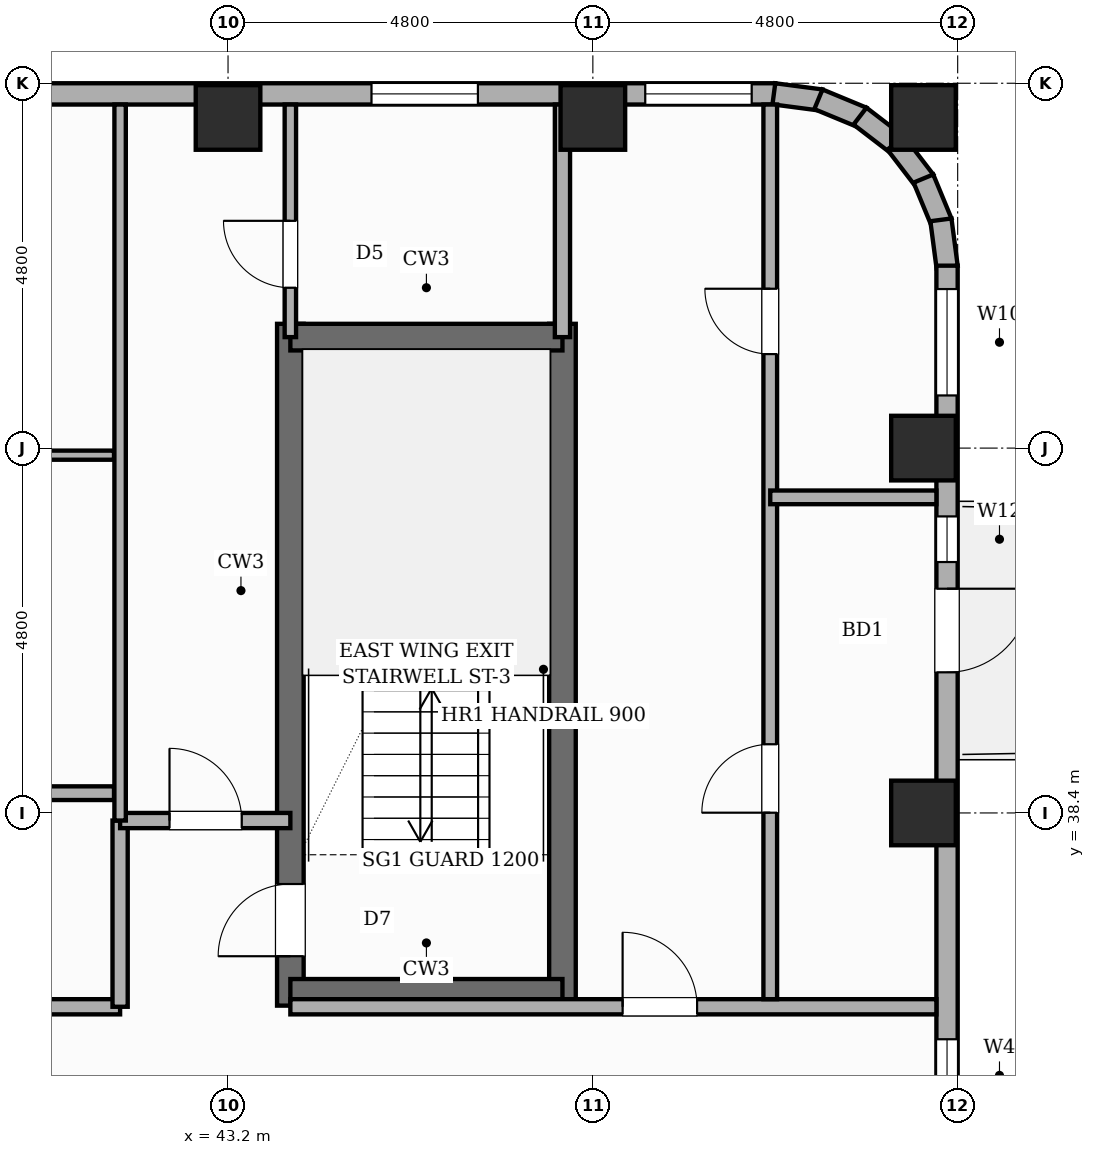
"""IFC4 building model, lengths in metres.
Left out: names, types, materials, properties, quantities, classifications, styles, units other than length and angle.
Written with IfcOpenShell. Run it as: python <this file> out.ifc"""

import sys

from ifc_helpers import new_model, si_unit, direction, frame, frame_2d, origin, origin_2d, place, context, subcontext, project, spatial, rectangle, extrude, element, fill, save


model = new_model("IFC4")
c1 = context("Model", 3, precision=1e-05, world=origin(), true_north=direction((0.0, 1.0)))
c2 = subcontext(c1, "Body", "Model", "MODEL_VIEW")
j1 = project(units=[si_unit("LENGTHUNIT", "METRE"), si_unit("PLANEANGLEUNIT", "RADIAN")], contexts=[c1])
p1 = place(None, origin())
s1 = spatial("IfcSite", under=j1, at=p1, CompositionType="ELEMENT")
p2 = place(p1, origin())
s2 = spatial("IfcBuilding", under=s1, at=p2, CompositionType="ELEMENT")
p3 = place(p2, frame((0.0, 0.0, 211.0)))
s3 = spatial("IfcBuildingStorey", under=s2, at=p3, CompositionType="ELEMENT", Elevation=211.0)
p4 = place(p3, frame((44.02, 35.865, 0.0), z_axis=(0.0, 0.0, 1.0), x_axis=(0.0, 1.0, 0.0)))
e1 = element("IfcWall", 1, at=p4, inside=s3, PredefinedType="SHEAR", context=c2, shape_type="SweptSolid", body=[
    extrude(rectangle(XDim=8.97, YDim=0.35, at=frame_2d((4.485, 0.0))), origin(), (0.0, 0.0, 1.0), 3.6),
])
p5 = place(p4, frame((0.65, 0.0, 0.0)))
e2 = element("IfcOpeningElement", 2, at=p5, cuts=e1, PredefinedType="OPENING", context=c2, shape_type="SweptSolid", body=[
    extrude(rectangle(XDim=0.95, YDim=2.1, at=frame_2d((0.475, 1.05))), frame((0.0, 0.185, 0.0), z_axis=(0.0, -1.0, 0.0), x_axis=(1.0, 0.0, 0.0)), (0.0, 0.0, 1.0), 0.37),
])
p6 = place(p3, frame((47.6, 35.865, 0.0), z_axis=(0.0, 0.0, 1.0), x_axis=(0.0, 1.0, 0.0)))
e3 = element("IfcWall", 3, at=p6, inside=s3, PredefinedType="SHEAR", context=c2, shape_type="SweptSolid", body=[
    extrude(rectangle(XDim=8.97, YDim=0.35, at=frame_2d((4.485, 0.0))), origin(), (0.0, 0.0, 1.0), 3.6),
])
for number, where, z_axis, x_axis in (
    (4, (44.02, 36.04, 0.0), (0.0, 0.0, 1.0), (1.0, 0.0, 0.0)),
    (5, (44.02, 44.66, 0.0), (0.0, 0.0, 1.0), (1.0, 0.0, 0.0)),
):
    element("IfcWall", number, at=place(p3, frame(where, z_axis=z_axis, x_axis=x_axis)), inside=s3, PredefinedType="SHEAR", context=c2, shape_type="SweptSolid", body=[
        extrude(rectangle(XDim=3.58, YDim=0.35, at=frame_2d((1.79, 0.0))), origin(), (0.0, 0.0, 1.0), 3.6),
    ])
for number, where, z_axis, x_axis in (
    (6, (43.2, 47.55, 0.0), (0.0, 0.0, 1.0), (1.0, 0.0, 0.0)),
    (7, (48.0, 47.55, 0.0), (0.0, 0.0, 1.0), (1.0, 0.0, 0.0)),
    (8, (52.35, 38.4, 0.0), (0.0, 0.0, 1.0), (1.0, 0.0, 0.0)),
    (9, (52.35, 43.2, 0.0), (0.0, 0.0, 1.0), (1.0, 0.0, 0.0)),
    (10, (52.35, 47.55, 0.0), (0.0, 0.0, 1.0), (1.0, 0.0, 0.0)),
):
    element("IfcColumn", number, at=place(p3, frame(where, z_axis=z_axis, x_axis=x_axis)), inside=s3, PredefinedType="COLUMN", context=c2, shape_type="SweptSolid", body=[
        extrude(rectangle(XDim=0.85, YDim=0.85, at=origin_2d()), origin(), (0.0, 0.0, 1.0), 3.6),
    ])
p7 = place(p3, frame((7.2, 47.86, 0.0), z_axis=(0.0, 0.0, 1.0), x_axis=(1.0, 0.0, 0.0)))
e11 = element("IfcWall", 11, at=p7, inside=s3, PredefinedType="STANDARD", context=c2, shape_type="SweptSolid", body=[
    extrude(rectangle(XDim=43.2, YDim=0.28, at=frame_2d((21.6, 0.0))), origin(), (0.0, 0.0, 1.0), 2.66),
])
p8 = place(p7, frame((28.866, 0.0, 0.65)))
e12 = element("IfcOpeningElement", 12, at=p8, cuts=e11, PredefinedType="OPENING", context=c2, shape_type="SweptSolid", body=[
    extrude(rectangle(XDim=1.4, YDim=1.1, at=frame_2d((0.7, 0.55))), frame((0.0, 0.15, 0.0), z_axis=(0.0, -1.0, 0.0), x_axis=(1.0, 0.0, 0.0)), (0.0, 0.0, 1.0), 0.3),
])
p9 = place(p7, frame((41.49, 0.0, 0.65)))
e13 = element("IfcOpeningElement", 13, at=p9, cuts=e11, PredefinedType="OPENING", context=c2, shape_type="SweptSolid", body=[
    extrude(rectangle(XDim=1.4, YDim=1.1, at=frame_2d((0.7, 0.55))), frame((0.0, 0.15, 0.0), z_axis=(0.0, -1.0, 0.0), x_axis=(1.0, 0.0, 0.0)), (0.0, 0.0, 1.0), 0.3),
])
p10 = place(p7, frame((18.74, 0.0, 0.45)))
e14 = element("IfcOpeningElement", 14, at=p10, cuts=e11, PredefinedType="OPENING", context=c2, shape_type="SweptSolid", body=[
    extrude(rectangle(XDim=0.95, YDim=1.8, at=frame_2d((0.475, 0.9))), frame((0.0, 0.15, 0.0), z_axis=(0.0, -1.0, 0.0), x_axis=(1.0, 0.0, 0.0)), (0.0, 0.0, 1.0), 0.3),
])
p11 = place(p7, frame((37.887, 0.0, 0.65)))
e15 = element("IfcOpeningElement", 15, at=p11, cuts=e11, PredefinedType="OPENING", context=c2, shape_type="SweptSolid", body=[
    extrude(rectangle(XDim=1.4, YDim=1.1, at=frame_2d((0.7, 0.55))), frame((0.0, 0.15, 0.0), z_axis=(0.0, -1.0, 0.0), x_axis=(1.0, 0.0, 0.0)), (0.0, 0.0, 1.0), 0.3),
])
p12 = place(p7, frame((0.308, 0.0, 0.65)))
e16 = element("IfcOpeningElement", 16, at=p12, cuts=e11, PredefinedType="OPENING", context=c2, shape_type="SweptSolid", body=[
    extrude(rectangle(XDim=1.4, YDim=1.1, at=frame_2d((0.7, 0.55))), frame((0.0, 0.15, 0.0), z_axis=(0.0, -1.0, 0.0), x_axis=(1.0, 0.0, 0.0)), (0.0, 0.0, 1.0), 0.3),
])
p13 = place(p7, frame((10.302, 0.0, 0.45)))
e17 = element("IfcOpeningElement", 17, at=p13, cuts=e11, PredefinedType="OPENING", context=c2, shape_type="SweptSolid", body=[
    extrude(rectangle(XDim=0.95, YDim=1.8, at=frame_2d((0.475, 0.9))), frame((0.0, 0.15, 0.0), z_axis=(0.0, -1.0, 0.0), x_axis=(1.0, 0.0, 0.0)), (0.0, 0.0, 1.0), 0.3),
])
p14 = place(p7, frame((23.492, 0.0, 0.65)))
e18 = element("IfcOpeningElement", 18, at=p14, cuts=e11, PredefinedType="OPENING", context=c2, shape_type="SweptSolid", body=[
    extrude(rectangle(XDim=1.4, YDim=1.1, at=frame_2d((0.7, 0.55))), frame((0.0, 0.15, 0.0), z_axis=(0.0, -1.0, 0.0), x_axis=(1.0, 0.0, 0.0)), (0.0, 0.0, 1.0), 0.3),
])
p15 = place(p3, frame((50.382, 47.861, 0.0), z_axis=(0.0, 0.0, 1.0), x_axis=(0.991447664465, -0.130504898859, 0.0)))
e19 = element("IfcWall", 19, at=p15, inside=s3, PredefinedType="STANDARD", context=c2, shape_type="SweptSolid", body=[
    extrude(rectangle(XDim=0.627, YDim=0.28, at=frame_2d((0.313, 0.0))), origin(), (0.0, 0.0, 1.0), 2.66),
])
for number, where, z_axis, x_axis in (
    (20, (50.968, 47.789, 0.0), (0.0, 0.0, 1.0), (0.924, -0.382, 0.0)),
    (21, (51.515, 47.567, 0.0), (0.0, 0.0, 1.0), (0.793, -0.609, 0.0)),
    (22, (51.986, 47.212, 0.0), (0.0, 0.0, 1.0), (0.609, -0.793, 0.0)),
    (23, (52.349, 46.746, 0.0), (0.0, 0.0, 1.0), (0.383, -0.924, 0.0)),
    (24, (52.579, 46.203, 0.0), (0.0, 0.0, 1.0), (0.131, -0.991, 0.0)),
):
    element("IfcWall", number, at=place(p3, frame(where, z_axis=z_axis, x_axis=x_axis)), inside=s3, PredefinedType="STANDARD", context=c2, shape_type="SweptSolid", body=[
        extrude(rectangle(XDim=0.626, YDim=0.28, at=frame_2d((0.313, 0.0))), origin(), (0.0, 0.0, 1.0), 2.66),
    ])
p16 = place(p3, frame((52.66, 45.6, 0.0), z_axis=(0.0, 0.0, 1.0), x_axis=(0.0, -1.0, 0.0)))
e25 = element("IfcWall", 25, at=p16, inside=s3, PredefinedType="STANDARD", context=c2, shape_type="SweptSolid", body=[
    extrude(rectangle(XDim=14.4, YDim=0.28, at=frame_2d((7.2, 0.0))), origin(), (0.0, 0.0, 1.0), 2.66),
])
p17 = place(p16, frame((4.25, 0.0, 0.0)))
e26 = element("IfcOpeningElement", 26, at=p17, cuts=e25, PredefinedType="OPENING", context=c2, shape_type="SweptSolid", body=[
    extrude(rectangle(XDim=1.1, YDim=2.15, at=frame_2d((0.55, 1.075))), frame((0.0, 0.15, 0.0), z_axis=(0.0, -1.0, 0.0), x_axis=(1.0, 0.0, 0.0)), (0.0, 0.0, 1.0), 0.3),
])
p18 = place(p16, frame((10.177, 0.0, 0.45)))
e27 = element("IfcOpeningElement", 27, at=p18, cuts=e25, PredefinedType="OPENING", context=c2, shape_type="SweptSolid", body=[
    extrude(rectangle(XDim=0.95, YDim=1.8, at=frame_2d((0.475, 0.9))), frame((0.0, 0.15, 0.0), z_axis=(0.0, -1.0, 0.0), x_axis=(1.0, 0.0, 0.0)), (0.0, 0.0, 1.0), 0.3),
])
p19 = place(p16, frame((12.805, 0.0, 0.45)))
e28 = element("IfcOpeningElement", 28, at=p19, cuts=e25, PredefinedType="OPENING", context=c2, shape_type="SweptSolid", body=[
    extrude(rectangle(XDim=0.95, YDim=1.8, at=frame_2d((0.475, 0.9))), frame((0.0, 0.15, 0.0), z_axis=(0.0, -1.0, 0.0), x_axis=(1.0, 0.0, 0.0)), (0.0, 0.0, 1.0), 0.3),
])
p20 = place(p16, frame((0.308, 0.0, 0.65)))
e29 = element("IfcOpeningElement", 29, at=p20, cuts=e25, PredefinedType="OPENING", context=c2, shape_type="SweptSolid", body=[
    extrude(rectangle(XDim=1.4, YDim=1.1, at=frame_2d((0.7, 0.55))), frame((0.0, 0.15, 0.0), z_axis=(0.0, -1.0, 0.0), x_axis=(1.0, 0.0, 0.0)), (0.0, 0.0, 1.0), 0.3),
])
p21 = place(p16, frame((3.299, 0.0, 0.45)))
e30 = element("IfcOpeningElement", 30, at=p21, cuts=e25, PredefinedType="OPENING", context=c2, shape_type="SweptSolid", body=[
    extrude(rectangle(XDim=0.6, YDim=1.8, at=frame_2d((0.3, 0.9))), frame((0.0, 0.15, 0.0), z_axis=(0.0, -1.0, 0.0), x_axis=(1.0, 0.0, 0.0)), (0.0, 0.0, 1.0), 0.3),
])
p22 = place(p3, frame((27.35, 35.85, 0.0), z_axis=(0.0, 0.0, 1.0), x_axis=(1.0, 0.0, 0.0)))
e31 = element("IfcWall", 31, at=p22, inside=s3, PredefinedType="PARTITIONING", context=c2, shape_type="SweptSolid", body=[
    extrude(rectangle(XDim=14.43, YDim=0.2, at=frame_2d((7.215, 0.0))), origin(), (0.0, 0.0, 1.0), 3.38),
])
p23 = place(p22, frame((4.803, 0.0, 0.0)))
e32 = element("IfcOpeningElement", 32, at=p23, cuts=e31, PredefinedType="OPENING", context=c2, shape_type="SweptSolid", body=[
    extrude(rectangle(XDim=0.98, YDim=2.18, at=frame_2d((0.49, 1.09))), frame((0.0, 0.11, 0.0), z_axis=(0.0, -1.0, 0.0), x_axis=(1.0, 0.0, 0.0)), (0.0, 0.0, 1.0), 0.22),
])
p24 = place(p3, frame((44.02, 35.85, 0.0), z_axis=(0.0, 0.0, 1.0), x_axis=(1.0, 0.0, 0.0)))
e33 = element("IfcWall", 33, at=p24, inside=s3, PredefinedType="PARTITIONING", context=c2, shape_type="SweptSolid", body=[
    extrude(rectangle(XDim=8.5, YDim=0.2, at=frame_2d((4.25, 0.0))), origin(), (0.0, 0.0, 1.0), 3.38),
])
p25 = place(p24, frame((4.372, 0.0, 0.0)))
e34 = element("IfcOpeningElement", 34, at=p25, cuts=e33, PredefinedType="OPENING", context=c2, shape_type="SweptSolid", body=[
    extrude(rectangle(XDim=0.98, YDim=2.18, at=frame_2d((0.49, 1.09))), frame((0.0, 0.11, 0.0), z_axis=(0.0, -1.0, 0.0), x_axis=(1.0, 0.0, 0.0)), (0.0, 0.0, 1.0), 0.22),
])
p26 = place(p3, frame((41.78, 35.85, 0.0), z_axis=(0.0, 0.0, 1.0), x_axis=(0.0, 1.0, 0.0)))
e35 = element("IfcWall", 35, at=p26, inside=s3, PredefinedType="PARTITIONING", context=c2, shape_type="SweptSolid", body=[
    extrude(rectangle(XDim=2.45, YDim=0.2, at=frame_2d((1.225, 0.0))), origin(), (0.0, 0.0, 1.0), 3.38),
])
p27 = place(p3, frame((41.78, 38.3, 0.0), z_axis=(0.0, 0.0, 1.0), x_axis=(1.0, 0.0, 0.0)))
e36 = element("IfcWall", 36, at=p27, inside=s3, PredefinedType="PARTITIONING", context=c2, shape_type="SweptSolid", body=[
    extrude(rectangle(XDim=2.24, YDim=0.2, at=frame_2d((1.12, 0.0))), origin(), (0.0, 0.0, 1.0), 3.38),
])
p28 = place(p27, frame((0.65, 0.0, 0.0)))
e37 = element("IfcOpeningElement", 37, at=p28, cuts=e36, PredefinedType="OPENING", context=c2, shape_type="SweptSolid", body=[
    extrude(rectangle(XDim=0.95, YDim=2.15, at=frame_2d((0.475, 1.075))), frame((0.0, 0.11, 0.0), z_axis=(0.0, -1.0, 0.0), x_axis=(1.0, 0.0, 0.0)), (0.0, 0.0, 1.0), 0.22),
])
p29 = place(p3, frame((35.577, 38.66, 0.0), z_axis=(0.0, 0.0, 1.0), x_axis=(1.0, 0.0, 0.0)))
e38 = element("IfcWall", 38, at=p29, inside=s3, PredefinedType="PLUMBINGWALL", context=c2, shape_type="SweptSolid", body=[
    extrude(rectangle(XDim=6.123, YDim=0.18, at=frame_2d((3.062, 0.0))), origin(), (0.0, 0.0, 1.0), 3.38),
])
p30 = place(p3, frame((35.577, 43.107, 0.0), z_axis=(0.0, 0.0, 1.0), x_axis=(1.0, 0.0, 0.0)))
e39 = element("IfcWall", 39, at=p30, inside=s3, PredefinedType="PARTITIONING", context=c2, shape_type="SweptSolid", body=[
    extrude(rectangle(XDim=6.123, YDim=0.12, at=frame_2d((3.062, 0.0))), origin(), (0.0, 0.0, 1.0), 3.38),
])
p31 = place(p3, frame((41.78, 38.3, 0.0), z_axis=(0.0, 0.0, 1.0), x_axis=(0.0, 1.0, 0.0)))
e40 = element("IfcWall", 40, at=p31, inside=s3, PredefinedType="PARTITIONING", context=c2, shape_type="SweptSolid", body=[
    extrude(rectangle(XDim=9.42, YDim=0.15, at=frame_2d((4.71, 0.0))), origin(), (0.0, 0.0, 1.0), 3.38),
])
p32 = place(p3, frame((50.334, 35.95, 0.0), z_axis=(0.0, 0.0, 1.0), x_axis=(0.0, 1.0, 0.0)))
e41 = element("IfcWall", 41, at=p32, inside=s3, PredefinedType="PLUMBINGWALL", context=c2, shape_type="SweptSolid", body=[
    extrude(rectangle(XDim=11.77, YDim=0.18, at=frame_2d((5.885, 0.0))), origin(), (0.0, 0.0, 1.0), 3.38),
])
p33 = place(p32, frame((2.453, 0.0, 0.0)))
e42 = element("IfcOpeningElement", 42, at=p33, cuts=e41, PredefinedType="OPENING", context=c2, shape_type="SweptSolid", body=[
    extrude(rectangle(XDim=0.9, YDim=2.15, at=frame_2d((0.45, 1.075))), frame((0.0, 0.1, 0.0), z_axis=(0.0, -1.0, 0.0), x_axis=(1.0, 0.0, 0.0)), (0.0, 0.0, 1.0), 0.2),
])
p34 = place(p32, frame((8.487, 0.0, 0.0)))
e43 = element("IfcOpeningElement", 43, at=p34, cuts=e41, PredefinedType="OPENING", context=c2, shape_type="SweptSolid", body=[
    extrude(rectangle(XDim=0.86, YDim=2.1, at=frame_2d((0.43, 1.05))), frame((0.0, 0.1, 0.0), z_axis=(0.0, -1.0, 0.0), x_axis=(1.0, 0.0, 0.0)), (0.0, 0.0, 1.0), 0.2),
])
p35 = place(p3, frame((50.334, 42.552, 0.0), z_axis=(0.0, 0.0, 1.0), x_axis=(1.0, 0.0, 0.0)))
e44 = element("IfcWall", 44, at=p35, inside=s3, PredefinedType="PLUMBINGWALL", context=c2, shape_type="SweptSolid", body=[
    extrude(rectangle(XDim=2.186, YDim=0.18, at=frame_2d((1.093, 0.0))), origin(), (0.0, 0.0, 1.0), 3.38),
])
p36 = place(p3, frame((44.02, 44.66, 0.0), z_axis=(0.0, 0.0, 1.0), x_axis=(0.0, 1.0, 0.0)))
e45 = element("IfcWall", 45, at=p36, inside=s3, PredefinedType="PARTITIONING", context=c2, shape_type="SweptSolid", body=[
    extrude(rectangle(XDim=3.06, YDim=0.15, at=frame_2d((1.53, 0.0))), origin(), (0.0, 0.0, 1.0), 3.38),
])
p37 = place(p36, frame((0.65, 0.0, 0.0)))
e46 = element("IfcOpeningElement", 46, at=p37, cuts=e45, PredefinedType="OPENING", context=c2, shape_type="SweptSolid", body=[
    extrude(rectangle(XDim=0.88, YDim=2.1, at=frame_2d((0.44, 1.05))), frame((0.0, 0.085, 0.0), z_axis=(0.0, -1.0, 0.0), x_axis=(1.0, 0.0, 0.0)), (0.0, 0.0, 1.0), 0.17),
])
p38 = place(p3, frame((47.6, 44.66, 0.0), z_axis=(0.0, 0.0, 1.0), x_axis=(0.0, 1.0, 0.0)))
e47 = element("IfcWall", 47, at=p38, inside=s3, PredefinedType="SOLIDWALL", context=c2, shape_type="SweptSolid", body=[
    extrude(rectangle(XDim=3.06, YDim=0.2, at=frame_2d((1.53, 0.0))), origin(), (0.0, 0.0, 1.0), 3.38),
])
p39 = place(p9, origin())
e48 = element("IfcWindow", 48, at=p39, inside=s3, PartitioningType="SINGLE_PANEL", PredefinedType="WINDOW", context=c2, shape_type="SweptSolid", body=[
    extrude(rectangle(XDim=1.4, YDim=1.1, at=frame_2d((0.7, 0.55))), frame((0.0, 0.03, 0.0), z_axis=(0.0, -1.0, 0.0), x_axis=(1.0, 0.0, 0.0)), (0.0, 0.0, 1.0), 0.06),
])
fill(e13, e48)
p40 = place(p11, origin())
e49 = element("IfcWindow", 49, at=p40, inside=s3, PartitioningType="SINGLE_PANEL", PredefinedType="WINDOW", context=c2, shape_type="SweptSolid", body=[
    extrude(rectangle(XDim=1.4, YDim=1.1, at=frame_2d((0.7, 0.55))), frame((0.0, 0.03, 0.0), z_axis=(0.0, -1.0, 0.0), x_axis=(1.0, 0.0, 0.0)), (0.0, 0.0, 1.0), 0.06),
])
fill(e15, e49)
p41 = place(p17, origin())
e50 = element("IfcDoor", 50, at=p41, inside=s3, OperationType="SINGLE_SWING_LEFT", PredefinedType="DOOR", context=c2, shape_type="SweptSolid", body=[
    extrude(rectangle(XDim=1.1, YDim=2.15, at=frame_2d((0.55, 1.075))), frame((0.0, 0.025, 0.0), z_axis=(0.0, -1.0, 0.0), x_axis=(1.0, 0.0, 0.0)), (0.0, 0.0, 1.0), 0.05),
])
fill(e26, e50)
p42 = place(p18, origin())
e51 = element("IfcWindow", 51, at=p42, inside=s3, PartitioningType="SINGLE_PANEL", PredefinedType="WINDOW", context=c2, shape_type="SweptSolid", body=[
    extrude(rectangle(XDim=0.95, YDim=1.8, at=frame_2d((0.475, 0.9))), frame((0.0, 0.03, 0.0), z_axis=(0.0, -1.0, 0.0), x_axis=(1.0, 0.0, 0.0)), (0.0, 0.0, 1.0), 0.06),
])
fill(e27, e51)
p43 = place(p20, origin())
e52 = element("IfcWindow", 52, at=p43, inside=s3, PartitioningType="SINGLE_PANEL", PredefinedType="WINDOW", context=c2, shape_type="SweptSolid", body=[
    extrude(rectangle(XDim=1.4, YDim=1.1, at=frame_2d((0.7, 0.55))), frame((0.0, 0.03, 0.0), z_axis=(0.0, -1.0, 0.0), x_axis=(1.0, 0.0, 0.0)), (0.0, 0.0, 1.0), 0.06),
])
fill(e29, e52)
p44 = place(p21, origin())
e53 = element("IfcWindow", 53, at=p44, inside=s3, PartitioningType="SINGLE_PANEL", PredefinedType="WINDOW", context=c2, shape_type="SweptSolid", body=[
    extrude(rectangle(XDim=0.6, YDim=1.8, at=frame_2d((0.3, 0.9))), frame((0.0, 0.03, 0.0), z_axis=(0.0, -1.0, 0.0), x_axis=(1.0, 0.0, 0.0)), (0.0, 0.0, 1.0), 0.06),
])
fill(e30, e53)
p45 = place(p5, origin())
e54 = element("IfcDoor", 54, at=p45, inside=s3, OperationType="SINGLE_SWING_LEFT", PredefinedType="DOOR", context=c2, shape_type="SweptSolid", body=[
    extrude(rectangle(XDim=0.95, YDim=2.1, at=frame_2d((0.475, 1.05))), frame((0.0, 0.025, 0.0), z_axis=(0.0, -1.0, 0.0), x_axis=(1.0, 0.0, 0.0)), (0.0, 0.0, 1.0), 0.05),
])
fill(e2, e54)
p46 = place(p28, origin())
e55 = element("IfcDoor", 55, at=p46, inside=s3, OperationType="SINGLE_SWING_LEFT", PredefinedType="DOOR", context=c2, shape_type="SweptSolid", body=[
    extrude(rectangle(XDim=0.95, YDim=2.15, at=frame_2d((0.475, 1.075))), frame((0.0, 0.025, 0.0), z_axis=(0.0, -1.0, 0.0), x_axis=(1.0, 0.0, 0.0)), (0.0, 0.0, 1.0), 0.05),
])
fill(e37, e55)
p47 = place(p25, origin())
e56 = element("IfcDoor", 56, at=p47, inside=s3, OperationType="SINGLE_SWING_LEFT", PredefinedType="DOOR", context=c2, shape_type="SweptSolid", body=[
    extrude(rectangle(XDim=0.98, YDim=2.18, at=frame_2d((0.49, 1.09))), frame((0.0, 0.025, 0.0), z_axis=(0.0, -1.0, 0.0), x_axis=(1.0, 0.0, 0.0)), (0.0, 0.0, 1.0), 0.05),
])
fill(e34, e56)
p48 = place(p33, origin())
e57 = element("IfcDoor", 57, at=p48, inside=s3, OperationType="SINGLE_SWING_LEFT", PredefinedType="DOOR", context=c2, shape_type="SweptSolid", body=[
    extrude(rectangle(XDim=0.9, YDim=2.15, at=frame_2d((0.45, 1.075))), frame((0.0, 0.025, 0.0), z_axis=(0.0, -1.0, 0.0), x_axis=(1.0, 0.0, 0.0)), (0.0, 0.0, 1.0), 0.05),
])
fill(e42, e57)
p49 = place(p34, origin())
e58 = element("IfcDoor", 58, at=p49, inside=s3, OperationType="SINGLE_SWING_RIGHT", PredefinedType="DOOR", context=c2, shape_type="SweptSolid", body=[
    extrude(rectangle(XDim=0.86, YDim=2.1, at=frame_2d((0.43, 1.05))), frame((0.0, 0.025, 0.0), z_axis=(0.0, -1.0, 0.0), x_axis=(1.0, 0.0, 0.0)), (0.0, 0.0, 1.0), 0.05),
])
fill(e43, e58)
p50 = place(p37, origin())
e59 = element("IfcDoor", 59, at=p50, inside=s3, OperationType="SINGLE_SWING_RIGHT", PredefinedType="DOOR", context=c2, shape_type="SweptSolid", body=[
    extrude(rectangle(XDim=0.88, YDim=2.1, at=frame_2d((0.44, 1.05))), frame((0.0, 0.025, 0.0), z_axis=(0.0, -1.0, 0.0), x_axis=(1.0, 0.0, 0.0)), (0.0, 0.0, 1.0), 0.05),
])
fill(e46, e59)
save(model, sys.argv[1])
